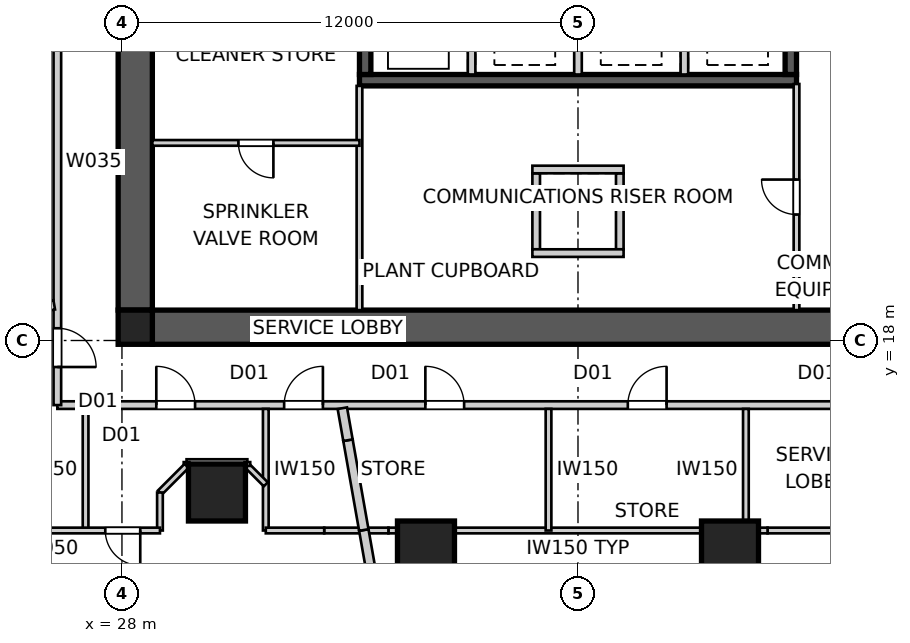
"""IFC4 building model, lengths in metres.
Left out: names, types, materials, properties, quantities, classifications, styles, units other than length and angle.
Written with IfcOpenShell. Run it as: python <this file> out.ifc"""

import sys

from ifc_helpers import new_model, si_unit, direction, frame, frame_2d, origin, origin_2d, place, context, subcontext, project, spatial, polyline, rectangle, outline, extrude, element, fill, save


model = new_model("IFC4")
c1 = context("Model", 3, precision=1e-05, world=origin(), true_north=direction((0.0, 1.0)))
c2 = subcontext(c1, "Body", "Model", "MODEL_VIEW")
j1 = project(units=[si_unit("LENGTHUNIT", "METRE"), si_unit("PLANEANGLEUNIT", "RADIAN")], contexts=[c1])
p1 = place(None, origin())
s1 = spatial("IfcSite", under=j1, at=p1, CompositionType="ELEMENT")
p2 = place(p1, origin())
s2 = spatial("IfcBuilding", under=s1, at=p2, CompositionType="ELEMENT")
p3 = place(p2, frame((0.0, 0.0, 74.4)))
s3 = spatial("IfcBuildingStorey", under=s2, at=p3, CompositionType="ELEMENT", Elevation=74.4)
p4 = place(p3, frame((51.2, 18.35, 0.0), z_axis=(0.0, 0.0, 1.0), x_axis=(-1.0, 0.0, 0.0)))
e1 = element("IfcWall", 1, at=p4, inside=s3, PredefinedType="SHEAR", context=c2, shape_type="SweptSolid", body=[
    extrude(outline(polyline([(0.0, -0.45), (22.4, -0.45), (22.4, -0.025), (22.85, -0.025), (22.85, 0.025), (22.4, 0.025), (22.4, 0.45), (0.0, 0.45), (0.0, 0.025), (-0.45, 0.025), (-0.45, -0.025), (0.0, -0.025), (0.0, -0.45)])), origin(), (0.0, 0.0, 1.0), 5.0),
])
p5 = place(p3, frame((28.35, 41.2, 0.0), z_axis=(0.0, 0.0, 1.0), x_axis=(0.0, -1.0, 0.0)))
e2 = element("IfcWall", 2, at=p5, inside=s3, PredefinedType="SHEAR", context=c2, shape_type="SweptSolid", body=[
    extrude(outline(polyline([(0.0, -0.45), (22.4, -0.45), (22.4, -0.025), (22.85, -0.025), (22.85, 0.025), (22.4, 0.025), (22.4, 0.45), (0.0, 0.45), (0.0, 0.025), (-0.45, 0.025), (-0.45, -0.025), (0.0, -0.025), (0.0, -0.45)])), origin(), (0.0, 0.0, 1.0), 5.0),
])
p6 = place(p5, frame((11.14, 0.0, 0.0)))
e3 = element("IfcOpeningElement", 3, at=p6, cuts=e2, PredefinedType="OPENING", context=c2, shape_type="SweptSolid", body=[
    extrude(rectangle(XDim=1.02, YDim=2.4, at=frame_2d((0.51, 1.2))), frame((0.0, 0.46, 0.0), z_axis=(0.0, -1.0, 0.0), x_axis=(1.0, 0.0, 0.0)), (0.0, 0.0, 1.0), 0.92),
])
p7 = place(p3, frame((45.75, 24.85, 0.0), z_axis=(0.0, 0.0, 1.0), x_axis=(-1.0, 0.0, 0.0)))
e4 = element("IfcWall", 4, at=p7, inside=s3, PredefinedType="SHEAR", context=c2, shape_type="SweptSolid", body=[
    extrude(rectangle(XDim=11.5, YDim=0.3, at=frame_2d((5.75, 0.0))), origin(), (0.0, 0.0, 1.0), 5.0),
])
p8 = place(p3, frame((45.6, 27.8, 0.0), z_axis=(0.0, 0.0, 1.0), x_axis=(0.0, -1.0, 0.0)))
e5 = element("IfcWall", 5, at=p8, inside=s3, PredefinedType="SHEAR", context=c2, shape_type="SweptSolid", body=[
    extrude(rectangle(XDim=2.8, YDim=0.3, at=frame_2d((1.4, 0.0))), origin(), (0.0, 0.0, 1.0), 5.0),
])
for number, where, z_axis, x_axis in (
    (6, (42.8, 27.8, 0.0), (0.0, 0.0, 1.0), (0.0, -1.0, 0.0)),
    (7, (40.0, 27.8, 0.0), (0.0, 0.0, 1.0), (0.0, -1.0, 0.0)),
    (8, (37.2, 27.8, 0.0), (0.0, 0.0, 1.0), (0.0, -1.0, 0.0)),
):
    element("IfcWall", number, at=place(p3, frame(where, z_axis=z_axis, x_axis=x_axis)), inside=s3, PredefinedType="SOLIDWALL", context=c2, shape_type="SweptSolid", body=[
        extrude(rectangle(XDim=2.8, YDim=0.2, at=frame_2d((1.4, 0.0))), origin(), (0.0, 0.0, 1.0), 5.0),
    ])
p9 = place(p3, frame((34.4, 27.8, 0.0), z_axis=(0.0, 0.0, 1.0), x_axis=(0.0, -1.0, 0.0)))
e9 = element("IfcWall", 9, at=p9, inside=s3, PredefinedType="SHEAR", context=c2, shape_type="SweptSolid", body=[
    extrude(rectangle(XDim=2.8, YDim=0.3, at=frame_2d((1.4, 0.0))), origin(), (0.0, 0.0, 1.0), 5.0),
])
for number, where, z_axis, x_axis in (
    (10, (38.9, 22.4, 0.0), (0.0, 0.0, 1.0), (0.0, -1.0, 0.0)),
    (11, (41.1, 22.4, 0.0), (0.0, 0.0, 1.0), (0.0, -1.0, 0.0)),
):
    element("IfcWall", number, at=place(p3, frame(where, z_axis=z_axis, x_axis=x_axis)), inside=s3, PredefinedType="SOLIDWALL", context=c2, shape_type="SweptSolid", body=[
        extrude(rectangle(XDim=2.0, YDim=0.2, at=frame_2d((1.0, 0.0))), origin(), (0.0, 0.0, 1.0), 5.0),
    ])
for number, where, z_axis, x_axis in (
    (12, (38.8, 22.5, 0.0), (0.0, 0.0, 1.0), (1.0, 0.0, 0.0)),
    (13, (38.8, 20.3, 0.0), (0.0, 0.0, 1.0), (1.0, 0.0, 0.0)),
):
    element("IfcWall", number, at=place(p3, frame(where, z_axis=z_axis, x_axis=x_axis)), inside=s3, PredefinedType="SOLIDWALL", context=c2, shape_type="SweptSolid", body=[
        extrude(rectangle(XDim=2.4, YDim=0.2, at=frame_2d((1.2, 0.0))), origin(), (0.0, 0.0, 1.0), 5.0),
    ])
p10 = place(p3, frame((28.35, 18.35, 0.0), z_axis=(0.0, 0.0, 1.0), x_axis=(1.0, 0.0, 0.0)))
e14 = element("IfcColumn", 14, at=p10, inside=s3, PredefinedType="COLUMN", context=c2, shape_type="SweptSolid", body=[
    extrude(rectangle(XDim=0.9, YDim=0.9, at=origin_2d()), origin(), (0.0, 0.0, 1.0), 5.0),
])
for number, where, z_axis, x_axis in (
    (15, (30.5, 14.0, 0.0), (0.0, 0.0, 1.0), (1.0, 0.0, 0.0)),
    (16, (36.0, 12.5, 0.0), (0.0, 0.0, 1.0), (1.0, 0.0, 0.0)),
    (17, (44.0, 12.5, 0.0), (0.0, 0.0, 1.0), (1.0, 0.0, 0.0)),
):
    element("IfcColumn", number, at=place(p3, frame(where, z_axis=z_axis, x_axis=x_axis)), inside=s3, PredefinedType="COLUMN", context=c2, shape_type="SweptSolid", body=[
        extrude(rectangle(XDim=1.5, YDim=1.5, at=origin_2d()), origin(), (0.0, 0.0, 1.0), 5.0),
    ])
p11 = place(p3, frame((26.3, 16.3, 0.0), z_axis=(0.0, 0.0, 1.0), x_axis=(1.0, 0.0, 0.0)))
e18 = element("IfcWall", 18, at=p11, inside=s3, PredefinedType="PARTITIONING", context=c2, shape_type="SweptSolid", body=[
    extrude(rectangle(XDim=27.4, YDim=0.2, at=frame_2d((13.7, 0.0))), origin(), (0.0, 0.0, 1.0), 4.85),
])
p12 = place(p11, frame((20.916, 0.0, 0.0)))
e19 = element("IfcOpeningElement", 19, at=p12, cuts=e18, PredefinedType="OPENING", context=c2, shape_type="SweptSolid", body=[
    extrude(rectangle(XDim=1.02, YDim=2.34, at=frame_2d((0.51, 1.17))), frame((0.0, 0.11, 0.0), z_axis=(0.0, -1.0, 0.0), x_axis=(1.0, 0.0, 0.0)), (0.0, 0.0, 1.0), 0.22),
])
p13 = place(p11, frame((9.684, 0.0, 0.0)))
e20 = element("IfcOpeningElement", 20, at=p13, cuts=e18, PredefinedType="OPENING", context=c2, shape_type="SweptSolid", body=[
    extrude(rectangle(XDim=1.02, YDim=2.34, at=frame_2d((0.51, 1.17))), frame((0.0, 0.11, 0.0), z_axis=(0.0, -1.0, 0.0), x_axis=(1.0, 0.0, 0.0)), (0.0, 0.0, 1.0), 0.22),
])
p14 = place(p11, frame((15.011, 0.0, 0.0)))
e21 = element("IfcOpeningElement", 21, at=p14, cuts=e18, PredefinedType="OPENING", context=c2, shape_type="SweptSolid", body=[
    extrude(rectangle(XDim=1.02, YDim=2.34, at=frame_2d((0.51, 1.17))), frame((0.0, 0.11, 0.0), z_axis=(0.0, -1.0, 0.0), x_axis=(1.0, 0.0, 0.0)), (0.0, 0.0, 1.0), 0.22),
])
p15 = place(p11, frame((2.604, 0.0, 0.0)))
e22 = element("IfcOpeningElement", 22, at=p15, cuts=e18, PredefinedType="OPENING", context=c2, shape_type="SweptSolid", body=[
    extrude(rectangle(XDim=1.02, YDim=2.34, at=frame_2d((0.51, 1.17))), frame((0.0, 0.11, 0.0), z_axis=(0.0, -1.0, 0.0), x_axis=(1.0, 0.0, 0.0)), (0.0, 0.0, 1.0), 0.22),
])
p16 = place(p11, frame((5.968, 0.0, 0.0)))
e23 = element("IfcOpeningElement", 23, at=p16, cuts=e18, PredefinedType="OPENING", context=c2, shape_type="SweptSolid", body=[
    extrude(rectangle(XDim=1.02, YDim=2.34, at=frame_2d((0.51, 1.17))), frame((0.0, 0.11, 0.0), z_axis=(0.0, -1.0, 0.0), x_axis=(1.0, 0.0, 0.0)), (0.0, 0.0, 1.0), 0.22),
])
p17 = place(p3, frame((26.3, 43.7, 0.0), z_axis=(0.0, 0.0, 1.0), x_axis=(0.0, -1.0, 0.0)))
e24 = element("IfcWall", 24, at=p17, inside=s3, PredefinedType="PARTITIONING", context=c2, shape_type="SweptSolid", body=[
    extrude(rectangle(XDim=27.4, YDim=0.2, at=frame_2d((13.7, 0.0))), origin(), (0.0, 0.0, 1.0), 4.85),
])
p18 = place(p17, frame((15.588, 0.0, 0.0)))
e25 = element("IfcOpeningElement", 25, at=p18, cuts=e24, PredefinedType="OPENING", context=c2, shape_type="SweptSolid", body=[
    extrude(rectangle(XDim=1.02, YDim=2.34, at=frame_2d((0.51, 1.17))), frame((0.0, 0.11, 0.0), z_axis=(0.0, -1.0, 0.0), x_axis=(1.0, 0.0, 0.0)), (0.0, 0.0, 1.0), 0.22),
])
p19 = place(p17, frame((2.604, 0.0, 0.0)))
e26 = element("IfcOpeningElement", 26, at=p19, cuts=e24, PredefinedType="OPENING", context=c2, shape_type="SweptSolid", body=[
    extrude(rectangle(XDim=1.02, YDim=2.34, at=frame_2d((0.51, 1.17))), frame((0.0, 0.11, 0.0), z_axis=(0.0, -1.0, 0.0), x_axis=(1.0, 0.0, 0.0)), (0.0, 0.0, 1.0), 0.22),
])
p20 = place(p17, frame((25.378, 0.0, 0.0)))
e27 = element("IfcOpeningElement", 27, at=p20, cuts=e24, PredefinedType="OPENING", context=c2, shape_type="SweptSolid", body=[
    extrude(rectangle(XDim=1.02, YDim=2.34, at=frame_2d((0.51, 1.17))), frame((0.0, 0.11, 0.0), z_axis=(0.0, -1.0, 0.0), x_axis=(1.0, 0.0, 0.0)), (0.0, 0.0, 1.0), 0.22),
])
p21 = place(p17, frame((5.968, 0.0, 0.0)))
e28 = element("IfcOpeningElement", 28, at=p21, cuts=e24, PredefinedType="OPENING", context=c2, shape_type="SweptSolid", body=[
    extrude(rectangle(XDim=1.02, YDim=2.34, at=frame_2d((0.51, 1.17))), frame((0.0, 0.11, 0.0), z_axis=(0.0, -1.0, 0.0), x_axis=(1.0, 0.0, 0.0)), (0.0, 0.0, 1.0), 0.22),
])
p22 = place(p3, frame((35.276, 7.843, 0.0), z_axis=(0.0, 0.0, 1.0), x_axis=(-0.173615529166, 0.984813509266, 0.0)))
e29 = element("IfcWall", 29, at=p22, inside=s3, PredefinedType="PARTITIONING", context=c2, shape_type="SweptSolid", body=[
    extrude(rectangle(XDim=5.25, YDim=0.25, at=frame_2d((2.625, 0.0))), origin(), (0.0, 0.0, 1.0), 4.85),
])
p23 = place(p3, frame((34.364, 13.013, 0.0), z_axis=(0.0, 0.0, 1.0), x_axis=(-0.17362866226, 0.984811193906, 0.0)))
e30 = element("IfcWall", 30, at=p23, inside=s3, PredefinedType="PARTITIONING", context=c2, shape_type="SweptSolid", body=[
    extrude(rectangle(XDim=2.4, YDim=0.25, at=frame_2d((1.2, 0.0))), origin(), (0.0, 0.0, 1.0), 4.322),
])
p24 = place(p3, frame((33.948, 15.376, 0.0), z_axis=(0.0, 0.0, 1.0), x_axis=(-0.173752728326, 0.984789312188, 0.0)))
e31 = element("IfcWall", 31, at=p24, inside=s3, PredefinedType="PARTITIONING", context=c2, shape_type="SweptSolid", body=[
    extrude(rectangle(XDim=0.854, YDim=0.25, at=frame_2d((0.427, 0.0))), origin(), (0.0, 0.0, 1.0), 4.85),
])
p25 = place(p3, frame((20.795, 17.982, 0.0), z_axis=(0.0, 0.0, 1.0), x_axis=(0.984803192417, 0.173674040102, 0.0)))
e32 = element("IfcWall", 32, at=p25, inside=s3, PredefinedType="PARTITIONING", context=c2, shape_type="SweptSolid", body=[
    extrude(rectangle(XDim=5.506, YDim=0.25, at=frame_2d((2.753, 0.0))), origin(), (0.0, 0.0, 1.0), 4.85),
])
p26 = place(p3, frame((45.75, 18.8, 0.0), z_axis=(0.0, 0.0, 1.0), x_axis=(0.0, 1.0, 0.0)))
e33 = element("IfcWall", 33, at=p26, inside=s3, PredefinedType="SOLIDWALL", context=c2, shape_type="SweptSolid", body=[
    extrude(rectangle(XDim=5.95, YDim=0.15, at=frame_2d((2.975, 0.0))), origin(), (0.0, 0.0, 1.0), 4.85),
])
p27 = place(p26, frame((2.515, 0.0, 0.0)))
e34 = element("IfcOpeningElement", 34, at=p27, cuts=e33, PredefinedType="OPENING", context=c2, shape_type="SweptSolid", body=[
    extrude(rectangle(XDim=0.92, YDim=2.1, at=frame_2d((0.46, 1.05))), frame((0.0, 0.085, 0.0), z_axis=(0.0, -1.0, 0.0), x_axis=(1.0, 0.0, 0.0)), (0.0, 0.0, 1.0), 0.17),
])
p28 = place(p3, frame((34.25, 18.8, 0.0), z_axis=(0.0, 0.0, 1.0), x_axis=(0.0, 1.0, 0.0)))
e35 = element("IfcWall", 35, at=p28, inside=s3, PredefinedType="SOLIDWALL", context=c2, shape_type="SweptSolid", body=[
    extrude(rectangle(XDim=5.9, YDim=0.15, at=frame_2d((2.95, 0.0))), origin(), (0.0, 0.0, 1.0), 4.85),
])
p29 = place(p3, frame((34.25, 23.2, 0.0), z_axis=(0.0, 0.0, 1.0), x_axis=(-1.0, 0.0, 0.0)))
e36 = element("IfcWall", 36, at=p29, inside=s3, PredefinedType="SOLIDWALL", context=c2, shape_type="SweptSolid", body=[
    extrude(rectangle(XDim=5.45, YDim=0.15, at=frame_2d((2.725, 0.0))), origin(), (0.0, 0.0, 1.0), 4.85),
])
p30 = place(p29, frame((2.265, 0.0, 0.0)))
e37 = element("IfcOpeningElement", 37, at=p30, cuts=e36, PredefinedType="OPENING", context=c2, shape_type="SweptSolid", body=[
    extrude(rectangle(XDim=0.92, YDim=2.1, at=frame_2d((0.46, 1.05))), frame((0.0, 0.085, 0.0), z_axis=(0.0, -1.0, 0.0), x_axis=(1.0, 0.0, 0.0)), (0.0, 0.0, 1.0), 0.17),
])
for number, where, z_axis, x_axis in (
    (38, (27.043, 13.0, 0.0), (0.0, 0.0, 1.0), (0.0, 1.0, 0.0)),
    (39, (31.785, 16.2, 0.0), (0.0, 0.0, 1.0), (0.0, -1.0, 0.0)),
):
    element("IfcWall", number, at=place(p3, frame(where, z_axis=z_axis, x_axis=x_axis)), inside=s3, PredefinedType="SOLIDWALL", context=c2, shape_type="SweptSolid", body=[
        extrude(rectangle(XDim=3.2, YDim=0.15, at=frame_2d((1.6, 0.0))), origin(), (0.0, 0.0, 1.0), 4.85),
    ])
p31 = place(p3, frame((31.785, 14.215, 0.0), z_axis=(0.0, 0.0, 1.0), x_axis=(-0.707106781187, 0.707106781187, 0.0)))
e40 = element("IfcWall", 40, at=p31, inside=s3, PredefinedType="SOLIDWALL", context=c2, shape_type="SweptSolid", body=[
    extrude(rectangle(XDim=0.686, YDim=0.15, at=frame_2d((0.343, 0.0))), origin(), (0.0, 0.0, 1.0), 4.85),
])
p32 = place(p3, frame((31.3, 14.8, 0.0), z_axis=(0.0, 0.0, 1.0), x_axis=(-1.0, 0.0, 0.0)))
e41 = element("IfcWall", 41, at=p32, inside=s3, PredefinedType="SOLIDWALL", context=c2, shape_type="SweptSolid", body=[
    extrude(rectangle(XDim=1.6, YDim=0.15, at=frame_2d((0.8, 0.0))), origin(), (0.0, 0.0, 1.0), 4.85),
])
p33 = place(p3, frame((29.7, 14.7, 0.0), z_axis=(0.0, 0.0, 1.0), x_axis=(-0.707106781187, -0.707106781187, 0.0)))
e42 = element("IfcWall", 42, at=p33, inside=s3, PredefinedType="SOLIDWALL", context=c2, shape_type="SweptSolid", body=[
    extrude(rectangle(XDim=0.99, YDim=0.15, at=frame_2d((0.495, 0.0))), origin(), (0.0, 0.0, 1.0), 4.85),
])
p34 = place(p3, frame((29.0, 14.0, 0.0), z_axis=(0.0, 0.0, 1.0), x_axis=(0.0, -1.0, 0.0)))
e43 = element("IfcWall", 43, at=p34, inside=s3, PredefinedType="SOLIDWALL", context=c2, shape_type="SweptSolid", body=[
    extrude(rectangle(XDim=1.0, YDim=0.15, at=frame_2d((0.5, 0.0))), origin(), (0.0, 0.0, 1.0), 4.85),
])
p35 = place(p3, frame((29.0, 13.0, 0.0), z_axis=(0.0, 0.0, 1.0), x_axis=(-1.0, 0.0, 0.0)))
e44 = element("IfcWall", 44, at=p35, inside=s3, PredefinedType="SOLIDWALL", context=c2, shape_type="SweptSolid", body=[
    extrude(rectangle(XDim=3.5, YDim=0.15, at=frame_2d((1.75, 0.0))), origin(), (0.0, 0.0, 1.0), 4.85),
])
p36 = place(p35, frame((0.519, 0.0, 0.0)))
e45 = element("IfcOpeningElement", 45, at=p36, cuts=e44, PredefinedType="OPENING", context=c2, shape_type="SweptSolid", body=[
    extrude(rectangle(XDim=0.92, YDim=2.1, at=frame_2d((0.46, 1.05))), frame((0.0, 0.085, 0.0), z_axis=(0.0, -1.0, 0.0), x_axis=(1.0, 0.0, 0.0)), (0.0, 0.0, 1.0), 0.17),
])
p37 = place(p3, frame((46.678, 13.0, 0.0), z_axis=(0.0, 0.0, 1.0), x_axis=(-1.0, 0.0, 0.0)))
e46 = element("IfcWall", 46, at=p37, inside=s3, PredefinedType="SOLIDWALL", context=c2, shape_type="SweptSolid", body=[
    extrude(rectangle(XDim=1.69, YDim=0.15, at=frame_2d((0.845, 0.0))), origin(), (0.0, 0.0, 1.0), 3.85),
])
p38 = place(p3, frame((44.988, 13.0, 0.0), z_axis=(0.0, 0.0, 1.0), x_axis=(-1.0, 0.0, 0.0)))
e47 = element("IfcWall", 47, at=p38, inside=s3, PredefinedType="SOLIDWALL", context=c2, shape_type="SweptSolid", body=[
    extrude(rectangle(XDim=9.977, YDim=0.15, at=frame_2d((4.988, 0.0))), origin(), (0.0, 0.0, 1.0), 4.85),
])
p39 = place(p3, frame((35.012, 13.0, 0.0), z_axis=(0.0, 0.0, 1.0), x_axis=(-1.0, 0.0, 0.0)))
e48 = element("IfcWall", 48, at=p39, inside=s3, PredefinedType="SOLIDWALL", context=c2, shape_type="SweptSolid", body=[
    extrude(rectangle(XDim=1.69, YDim=0.15, at=frame_2d((0.845, 0.0))), origin(), (0.0, 0.0, 1.0), 3.85),
])
p40 = place(p3, frame((33.322, 13.0, 0.0), z_axis=(0.0, 0.0, 1.0), x_axis=(-1.0, 0.0, 0.0)))
e49 = element("IfcWall", 49, at=p40, inside=s3, PredefinedType="SOLIDWALL", context=c2, shape_type="SweptSolid", body=[
    extrude(rectangle(XDim=1.537, YDim=0.15, at=frame_2d((0.768, 0.0))), origin(), (0.0, 0.0, 1.0), 4.85),
])
for number, where, z_axis, x_axis in (
    (50, (44.418, 13.0, 0.0), (0.0, 0.0, 1.0), (0.0, 1.0, 0.0)),
    (51, (39.225, 16.2, 0.0), (0.0, 0.0, 1.0), (0.0, -1.0, 0.0)),
):
    element("IfcWall", number, at=place(p3, frame(where, z_axis=z_axis, x_axis=x_axis)), inside=s3, PredefinedType="SOLIDWALL", context=c2, shape_type="SweptSolid", body=[
        extrude(rectangle(XDim=3.2, YDim=0.15, at=frame_2d((1.6, 0.0))), origin(), (0.0, 0.0, 1.0), 4.85),
    ])
for number, where, z_axis, x_axis in (
    (52, (31.3, 14.8, 0.0), (0.0, 0.0, 1.0), (0.0, -1.0, 0.0)),
    (53, (29.7, 14.8, 0.0), (0.0, 0.0, 1.0), (0.0, -1.0, 0.0)),
):
    element("IfcWall", number, at=place(p3, frame(where, z_axis=z_axis, x_axis=x_axis)), inside=s3, PredefinedType="SOLIDWALL", context=c2, shape_type="SweptSolid", body=[
        extrude(rectangle(XDim=0.1, YDim=0.15, at=frame_2d((0.05, 0.0))), origin(), (0.0, 0.0, 1.0), 4.85),
    ])
p41 = place(p13, origin())
e54 = element("IfcDoor", 54, at=p41, inside=s3, OperationType="SINGLE_SWING_LEFT", PredefinedType="DOOR", context=c2, shape_type="SweptSolid", body=[
    extrude(rectangle(XDim=1.02, YDim=2.34, at=frame_2d((0.51, 1.17))), frame((0.0, 0.025, 0.0), z_axis=(0.0, -1.0, 0.0), x_axis=(1.0, 0.0, 0.0)), (0.0, 0.0, 1.0), 0.05),
])
fill(e20, e54)
p42 = place(p14, origin())
e55 = element("IfcDoor", 55, at=p42, inside=s3, OperationType="SINGLE_SWING_RIGHT", PredefinedType="DOOR", context=c2, shape_type="SweptSolid", body=[
    extrude(rectangle(XDim=1.02, YDim=2.34, at=frame_2d((0.51, 1.17))), frame((0.0, 0.025, 0.0), z_axis=(0.0, -1.0, 0.0), x_axis=(1.0, 0.0, 0.0)), (0.0, 0.0, 1.0), 0.05),
])
fill(e21, e55)
p43 = place(p15, origin())
e56 = element("IfcDoor", 56, at=p43, inside=s3, OperationType="SINGLE_SWING_LEFT", PredefinedType="DOOR", context=c2, shape_type="SweptSolid", body=[
    extrude(rectangle(XDim=1.02, YDim=2.34, at=frame_2d((0.51, 1.17))), frame((0.0, 0.025, 0.0), z_axis=(0.0, -1.0, 0.0), x_axis=(1.0, 0.0, 0.0)), (0.0, 0.0, 1.0), 0.05),
])
fill(e22, e56)
p44 = place(p20, origin())
e57 = element("IfcDoor", 57, at=p44, inside=s3, OperationType="SINGLE_SWING_RIGHT", PredefinedType="DOOR", context=c2, shape_type="SweptSolid", body=[
    extrude(rectangle(XDim=1.02, YDim=2.34, at=frame_2d((0.51, 1.17))), frame((0.0, 0.025, 0.0), z_axis=(0.0, -1.0, 0.0), x_axis=(1.0, 0.0, 0.0)), (0.0, 0.0, 1.0), 0.05),
])
fill(e27, e57)
p45 = place(p16, origin())
e58 = element("IfcDoor", 58, at=p45, inside=s3, OperationType="SINGLE_SWING_RIGHT", PredefinedType="DOOR", context=c2, shape_type="SweptSolid", body=[
    extrude(rectangle(XDim=1.02, YDim=2.34, at=frame_2d((0.51, 1.17))), frame((0.0, 0.025, 0.0), z_axis=(0.0, -1.0, 0.0), x_axis=(1.0, 0.0, 0.0)), (0.0, 0.0, 1.0), 0.05),
])
fill(e23, e58)
p46 = place(p30, origin())
e59 = element("IfcDoor", 59, at=p46, inside=s3, OperationType="SINGLE_SWING_LEFT", PredefinedType="DOOR", context=c2, shape_type="SweptSolid", body=[
    extrude(rectangle(XDim=0.92, YDim=2.1, at=frame_2d((0.46, 1.05))), frame((0.0, 0.025, 0.0), z_axis=(0.0, -1.0, 0.0), x_axis=(1.0, 0.0, 0.0)), (0.0, 0.0, 1.0), 0.05),
])
fill(e37, e59)
p47 = place(p27, origin())
e60 = element("IfcDoor", 60, at=p47, inside=s3, OperationType="SINGLE_SWING_RIGHT", PredefinedType="DOOR", context=c2, shape_type="SweptSolid", body=[
    extrude(rectangle(XDim=0.92, YDim=2.1, at=frame_2d((0.46, 1.05))), frame((0.0, 0.025, 0.0), z_axis=(0.0, -1.0, 0.0), x_axis=(1.0, 0.0, 0.0)), (0.0, 0.0, 1.0), 0.05),
])
fill(e34, e60)
p48 = place(p36, origin())
e61 = element("IfcDoor", 61, at=p48, inside=s3, OperationType="SINGLE_SWING_LEFT", PredefinedType="DOOR", context=c2, shape_type="SweptSolid", body=[
    extrude(rectangle(XDim=0.92, YDim=2.1, at=frame_2d((0.46, 1.05))), frame((0.0, 0.025, 0.0), z_axis=(0.0, -1.0, 0.0), x_axis=(1.0, 0.0, 0.0)), (0.0, 0.0, 1.0), 0.05),
])
fill(e45, e61)
save(model, sys.argv[1])
